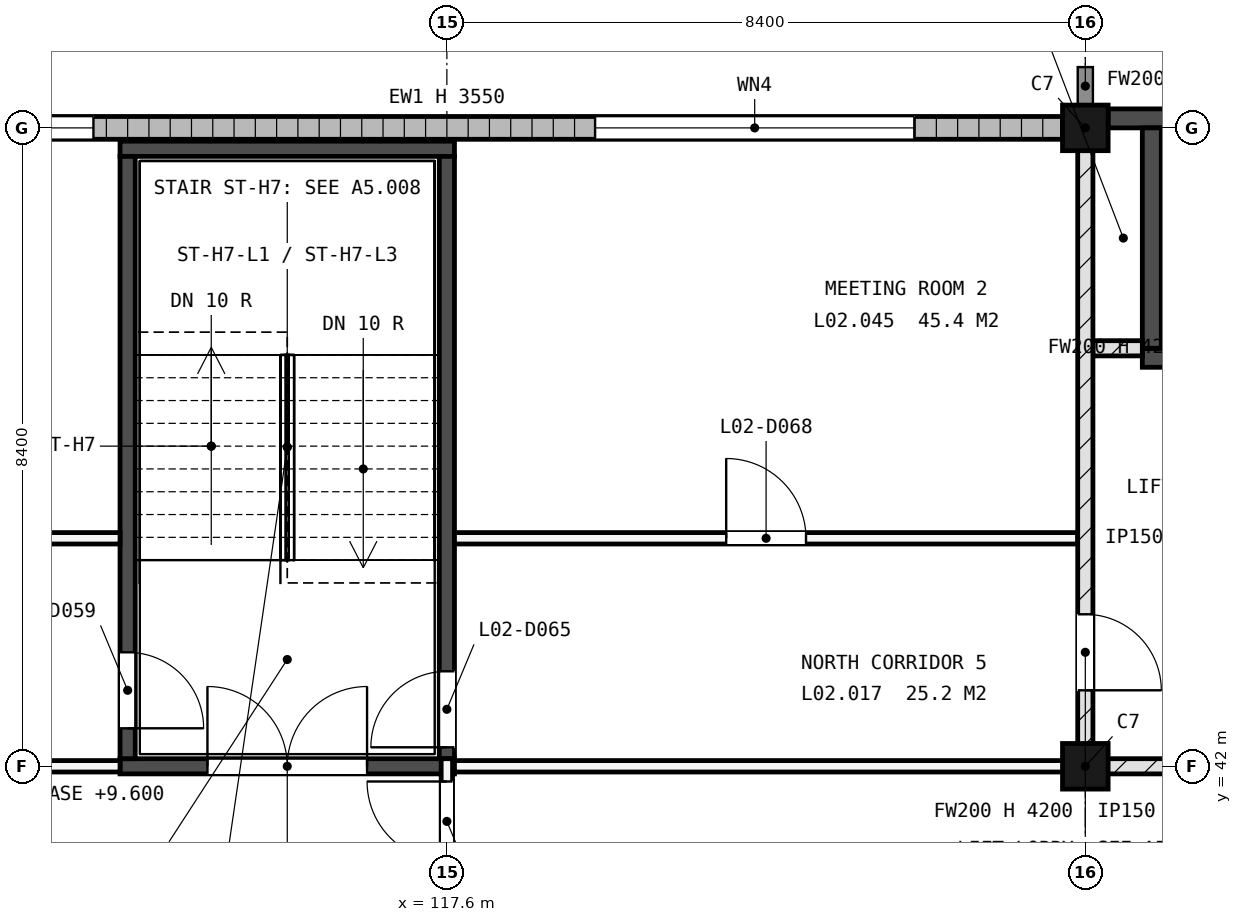
"""IFC4 building model, lengths in metres.
Left out: names, types, materials, properties, quantities, classifications, styles, units other than length and angle.
Written with IfcOpenShell. Run it as: python <this file> out.ifc"""

import sys

from ifc_helpers import new_model, si_unit, direction, frame, frame_2d, origin, origin_2d, place, context, subcontext, project, spatial, rectangle, extrude, element, fill, save


model = new_model("IFC4")
c1 = context("Model", 3, precision=1e-05, world=origin(), true_north=direction((0.0, 1.0)))
c2 = subcontext(c1, "Body", "Model", "MODEL_VIEW")
j1 = project(units=[si_unit("LENGTHUNIT", "METRE"), si_unit("PLANEANGLEUNIT", "RADIAN")], contexts=[c1])
p1 = place(None, origin())
s1 = spatial("IfcSite", under=j1, at=p1, CompositionType="ELEMENT")
p2 = place(p1, origin())
s2 = spatial("IfcBuilding", under=s1, at=p2, CompositionType="ELEMENT")
p3 = place(p2, frame((0.0, 0.0, 9.9)))
s3 = spatial("IfcBuildingStorey", under=s2, at=p3, CompositionType="ELEMENT", Elevation=9.9)
for number, where, z_axis, x_axis in (
    (1, (126.0, 42.0, -0.25), (0.0, 0.0, 1.0), (1.0, 0.0, 0.0)),
    (2, (126.0, 50.4, -0.25), (0.0, 0.0, 1.0), (1.0, 0.0, 0.0)),
):
    element("IfcColumn", number, at=place(p3, frame(where, z_axis=z_axis, x_axis=x_axis)), inside=s3, PredefinedType="COLUMN", context=c2, shape_type="SweptSolid", body=[
        extrude(rectangle(XDim=0.6, YDim=0.6, at=origin_2d()), origin(), (0.0, 0.0, 1.0), 4.45),
    ])
p4 = place(p3, frame((126.75, 47.375, -0.25), z_axis=(0.0, 0.0, 1.0), x_axis=(1.0, 0.0, 0.0)))
e3 = element("IfcWall", 3, at=p4, inside=s3, PredefinedType="SHEAR", context=c2, shape_type="SweptSolid", body=[
    extrude(rectangle(XDim=3.1, YDim=0.25, at=frame_2d((1.55, 0.0))), origin(), (0.0, 0.0, 1.0), 4.45),
])
p5 = place(p4, frame((1.0, 0.0, 0.25)))
e4 = element("IfcOpeningElement", 4, at=p5, cuts=e3, PredefinedType="OPENING", context=c2, shape_type="SweptSolid", body=[
    extrude(rectangle(XDim=1.1, YDim=2.1, at=frame_2d((0.55, 1.05))), frame((0.0, 0.135, 0.0), z_axis=(0.0, -1.0, 0.0), x_axis=(1.0, 0.0, 0.0)), (0.0, 0.0, 1.0), 0.27),
])
p6 = place(p3, frame((126.3, 50.525, -0.25), z_axis=(0.0, 0.0, 1.0), x_axis=(1.0, 0.0, 0.0)))
e5 = element("IfcWall", 5, at=p6, inside=s3, PredefinedType="SHEAR", context=c2, shape_type="SweptSolid", body=[
    extrude(rectangle(XDim=3.55, YDim=0.25, at=frame_2d((1.775, 0.0))), origin(), (0.0, 0.0, 1.0), 4.45),
])
p7 = place(p3, frame((126.875, 47.5, -0.25), z_axis=(0.0, 0.0, 1.0), x_axis=(0.0, 1.0, 0.0)))
e6 = element("IfcWall", 6, at=p7, inside=s3, PredefinedType="SHEAR", context=c2, shape_type="SweptSolid", body=[
    extrude(rectangle(XDim=2.9, YDim=0.25, at=frame_2d((1.45, 0.0))), origin(), (0.0, 0.0, 1.0), 4.45),
])
p8 = place(p3, frame((109.5, 50.4, 0.0), z_axis=(0.0, 0.0, 1.0), x_axis=(1.0, 0.0, 0.0)))
e7 = element("IfcWall", 7, at=p8, inside=s3, PredefinedType="STANDARD", context=c2, shape_type="SweptSolid", body=[
    extrude(rectangle(XDim=16.2, YDim=0.3, at=frame_2d((8.1, 0.0))), origin(), (0.0, 0.0, 1.0), 3.55),
])
p9 = place(p8, frame((0.45, 0.0, 0.9)))
e8 = element("IfcOpeningElement", 8, at=p9, cuts=e7, PredefinedType="OPENING", context=c2, shape_type="SweptSolid", body=[
    extrude(rectangle(XDim=3.0, YDim=1.5, at=frame_2d((1.5, 0.75))), frame((0.0, 0.16, 0.0), z_axis=(0.0, -1.0, 0.0), x_axis=(1.0, 0.0, 0.0)), (0.0, 0.0, 1.0), 0.32),
])
p10 = place(p8, frame((10.05, 0.0, 0.9)))
e9 = element("IfcOpeningElement", 9, at=p10, cuts=e7, PredefinedType="OPENING", context=c2, shape_type="SweptSolid", body=[
    extrude(rectangle(XDim=4.2, YDim=1.5, at=frame_2d((2.1, 0.75))), frame((0.0, 0.16, 0.0), z_axis=(0.0, -1.0, 0.0), x_axis=(1.0, 0.0, 0.0)), (0.0, 0.0, 1.0), 0.32),
])
p11 = place(p3, frame((113.3, 42.0, -0.3), z_axis=(0.0, 0.0, 1.0), x_axis=(1.0, 0.0, 0.0)))
e10 = element("IfcWall", 10, at=p11, inside=s3, PredefinedType="SHEAR", context=c2, shape_type="SweptSolid", body=[
    extrude(rectangle(XDim=4.4, YDim=0.2, at=frame_2d((2.2, 0.0))), origin(), (0.0, 0.0, 1.0), 4.5),
])
p12 = place(p11, frame((1.15, 0.0, 0.3)))
e11 = element("IfcOpeningElement", 11, at=p12, cuts=e10, PredefinedType="OPENING", context=c2, shape_type="SweptSolid", body=[
    extrude(rectangle(XDim=2.1, YDim=2.1, at=frame_2d((1.05, 1.05))), frame((0.0, 0.11, 0.0), z_axis=(0.0, -1.0, 0.0), x_axis=(1.0, 0.0, 0.0)), (0.0, 0.0, 1.0), 0.22),
])
p13 = place(p3, frame((113.3, 50.125, -0.3), z_axis=(0.0, 0.0, 1.0), x_axis=(1.0, 0.0, 0.0)))
e12 = element("IfcWall", 12, at=p13, inside=s3, PredefinedType="SHEAR", context=c2, shape_type="SweptSolid", body=[
    extrude(rectangle(XDim=4.4, YDim=0.2, at=frame_2d((2.2, 0.0))), origin(), (0.0, 0.0, 1.0), 4.5),
])
p14 = place(p3, frame((113.4, 42.1, -0.3), z_axis=(0.0, 0.0, 1.0), x_axis=(0.0, 1.0, 0.0)))
e13 = element("IfcWall", 13, at=p14, inside=s3, PredefinedType="SHEAR", context=c2, shape_type="SweptSolid", body=[
    extrude(rectangle(XDim=7.925, YDim=0.2, at=frame_2d((3.962, 0.0))), origin(), (0.0, 0.0, 1.0), 4.5),
])
p15 = place(p14, frame((0.4, 0.0, 0.3)))
e14 = element("IfcOpeningElement", 14, at=p15, cuts=e13, PredefinedType="OPENING", context=c2, shape_type="SweptSolid", body=[
    extrude(rectangle(XDim=1.0, YDim=2.1, at=frame_2d((0.5, 1.05))), frame((0.0, 0.11, 0.0), z_axis=(0.0, -1.0, 0.0), x_axis=(1.0, 0.0, 0.0)), (0.0, 0.0, 1.0), 0.22),
])
p16 = place(p3, frame((117.6, 42.1, -0.3), z_axis=(0.0, 0.0, 1.0), x_axis=(0.0, 1.0, 0.0)))
e15 = element("IfcWall", 15, at=p16, inside=s3, PredefinedType="SHEAR", context=c2, shape_type="SweptSolid", body=[
    extrude(rectangle(XDim=7.925, YDim=0.2, at=frame_2d((3.962, 0.0))), origin(), (0.0, 0.0, 1.0), 4.5),
])
p17 = place(p16, frame((0.15, 0.0, 0.3)))
e16 = element("IfcOpeningElement", 16, at=p17, cuts=e15, PredefinedType="OPENING", context=c2, shape_type="SweptSolid", body=[
    extrude(rectangle(XDim=1.0, YDim=2.1, at=frame_2d((0.5, 1.05))), frame((0.0, 0.11, 0.0), z_axis=(0.0, -1.0, 0.0), x_axis=(1.0, 0.0, 0.0)), (0.0, 0.0, 1.0), 0.22),
])
p18 = place(p3, frame((109.4, 42.0, 0.0), z_axis=(0.0, 0.0, 1.0), x_axis=(1.0, 0.0, 0.0)))
e17 = element("IfcWall", 17, at=p18, inside=s3, PredefinedType="PARTITIONING", context=c2, shape_type="SweptSolid", body=[
    extrude(rectangle(XDim=3.9, YDim=0.15, at=frame_2d((1.95, 0.0))), origin(), (0.0, 0.0, 1.0), 3.55),
])
p19 = place(p3, frame((117.7, 42.0, 0.0), z_axis=(0.0, 0.0, 1.0), x_axis=(1.0, 0.0, 0.0)))
e18 = element("IfcWall", 18, at=p19, inside=s3, PredefinedType="PARTITIONING", context=c2, shape_type="SweptSolid", body=[
    extrude(rectangle(XDim=8.3, YDim=0.15, at=frame_2d((4.15, 0.0))), origin(), (0.0, 0.0, 1.0), 4.2),
])
p20 = place(p3, frame((126.0, 42.0, 0.0), z_axis=(0.0, 0.0, 1.0), x_axis=(1.0, 0.0, 0.0)))
e19 = element("IfcWall", 19, at=p20, inside=s3, PredefinedType="SOLIDWALL", context=c2, shape_type="SweptSolid", body=[
    extrude(rectangle(XDim=4.1, YDim=0.2, at=frame_2d((2.05, 0.0))), origin(), (0.0, 0.0, 1.0), 4.2),
])
p21 = place(p3, frame((92.5, 45.0, 0.0), z_axis=(0.0, 0.0, 1.0), x_axis=(1.0, 0.0, 0.0)))
e20 = element("IfcWall", 20, at=p21, inside=s3, PredefinedType="PARTITIONING", context=c2, shape_type="SweptSolid", body=[
    extrude(rectangle(XDim=20.8, YDim=0.15, at=frame_2d((10.4, 0.0))), origin(), (0.0, 0.0, 1.0), 4.2),
])
p22 = place(p21, frame((9.9, 0.0, 0.0)))
e21 = element("IfcOpeningElement", 21, at=p22, cuts=e20, PredefinedType="OPENING", context=c2, shape_type="SweptSolid", body=[
    extrude(rectangle(XDim=1.0, YDim=2.1, at=frame_2d((0.5, 1.05))), frame((0.0, 0.085, 0.0), z_axis=(0.0, -1.0, 0.0), x_axis=(1.0, 0.0, 0.0)), (0.0, 0.0, 1.0), 0.17),
])
p23 = place(p3, frame((117.7, 45.0, 0.0), z_axis=(0.0, 0.0, 1.0), x_axis=(1.0, 0.0, 0.0)))
e22 = element("IfcWall", 22, at=p23, inside=s3, PredefinedType="PARTITIONING", context=c2, shape_type="SweptSolid", body=[
    extrude(rectangle(XDim=8.2, YDim=0.15, at=frame_2d((4.1, 0.0))), origin(), (0.0, 0.0, 1.0), 4.2),
])
p24 = place(p23, frame((3.575, 0.0, 0.0)))
e23 = element("IfcOpeningElement", 23, at=p24, cuts=e22, PredefinedType="OPENING", context=c2, shape_type="SweptSolid", body=[
    extrude(rectangle(XDim=1.05, YDim=2.1, at=frame_2d((0.525, 1.05))), frame((0.0, 0.085, 0.0), z_axis=(0.0, -1.0, 0.0), x_axis=(1.0, 0.0, 0.0)), (0.0, 0.0, 1.0), 0.17),
])
p25 = place(p3, frame((126.1, 47.5, 0.0), z_axis=(0.0, 0.0, 1.0), x_axis=(1.0, 0.0, 0.0)))
e24 = element("IfcWall", 24, at=p25, inside=s3, PredefinedType="SOLIDWALL", context=c2, shape_type="SweptSolid", body=[
    extrude(rectangle(XDim=0.65, YDim=0.2, at=frame_2d((0.325, 0.0))), origin(), (0.0, 0.0, 1.0), 4.2),
])
p26 = place(p3, frame((117.6, 33.32, 0.0), z_axis=(0.0, 0.0, 1.0), x_axis=(0.0, 1.0, 0.0)))
e25 = element("IfcWall", 25, at=p26, inside=s3, PredefinedType="PARTITIONING", context=c2, shape_type="SweptSolid", body=[
    extrude(rectangle(XDim=8.78, YDim=0.15, at=frame_2d((4.39, 0.0))), origin(), (0.0, 0.0, 1.0), 4.2),
])
p27 = place(p26, frame((7.43, 0.0, 0.0)))
e26 = element("IfcOpeningElement", 26, at=p27, cuts=e25, PredefinedType="OPENING", context=c2, shape_type="SweptSolid", body=[
    extrude(rectangle(XDim=1.05, YDim=2.1, at=frame_2d((0.525, 1.05))), frame((0.0, 0.085, 0.0), z_axis=(0.0, -1.0, 0.0), x_axis=(1.0, 0.0, 0.0)), (0.0, 0.0, 1.0), 0.17),
])
p28 = place(p3, frame((126.0, 42.1, 0.0), z_axis=(0.0, 0.0, 1.0), x_axis=(0.0, 1.0, 0.0)))
e27 = element("IfcWall", 27, at=p28, inside=s3, PredefinedType="SOLIDWALL", context=c2, shape_type="SweptSolid", body=[
    extrude(rectangle(XDim=8.3, YDim=0.2, at=frame_2d((4.15, 0.0))), origin(), (0.0, 0.0, 1.0), 3.4),
])
p29 = place(p28, frame((0.9, 0.0, 0.0)))
e28 = element("IfcOpeningElement", 28, at=p29, cuts=e27, PredefinedType="OPENING", context=c2, shape_type="SweptSolid", body=[
    extrude(rectangle(XDim=1.0, YDim=2.1, at=frame_2d((0.5, 1.05))), frame((0.0, 0.11, 0.0), z_axis=(0.0, -1.0, 0.0), x_axis=(1.0, 0.0, 0.0)), (0.0, 0.0, 1.0), 0.22),
])
p30 = place(p9, origin())
e29 = element("IfcWindow", 29, at=p30, inside=s3, PartitioningType="SINGLE_PANEL", PredefinedType="WINDOW", context=c2, shape_type="SweptSolid", body=[
    extrude(rectangle(XDim=3.0, YDim=1.5, at=frame_2d((1.5, 0.75))), frame((0.0, 0.03, 0.0), z_axis=(0.0, -1.0, 0.0), x_axis=(1.0, 0.0, 0.0)), (0.0, 0.0, 1.0), 0.06),
])
fill(e8, e29)
p31 = place(p10, origin())
e30 = element("IfcWindow", 30, at=p31, inside=s3, PartitioningType="SINGLE_PANEL", PredefinedType="WINDOW", context=c2, shape_type="SweptSolid", body=[
    extrude(rectangle(XDim=4.2, YDim=1.5, at=frame_2d((2.1, 0.75))), frame((0.0, 0.03, 0.0), z_axis=(0.0, -1.0, 0.0), x_axis=(1.0, 0.0, 0.0)), (0.0, 0.0, 1.0), 0.06),
])
fill(e9, e30)
p32 = place(p12, origin())
e31 = element("IfcDoor", 31, at=p32, inside=s3, OperationType="DOUBLE_DOOR_SINGLE_SWING", PredefinedType="DOOR", context=c2, shape_type="SweptSolid", body=[
    extrude(rectangle(XDim=2.1, YDim=2.1, at=frame_2d((1.05, 1.05))), frame((0.0, 0.025, 0.0), z_axis=(0.0, -1.0, 0.0), x_axis=(1.0, 0.0, 0.0)), (0.0, 0.0, 1.0), 0.05),
])
fill(e11, e31)
p33 = place(p17, origin())
e32 = element("IfcDoor", 32, at=p33, inside=s3, OperationType="SINGLE_SWING_RIGHT", PredefinedType="DOOR", context=c2, shape_type="SweptSolid", body=[
    extrude(rectangle(XDim=1.0, YDim=2.1, at=frame_2d((0.5, 1.05))), frame((0.0, 0.025, 0.0), z_axis=(0.0, -1.0, 0.0), x_axis=(1.0, 0.0, 0.0)), (0.0, 0.0, 1.0), 0.05),
])
fill(e16, e32)
p34 = place(p27, origin())
e33 = element("IfcDoor", 33, at=p34, inside=s3, OperationType="SINGLE_SWING_LEFT", PredefinedType="DOOR", context=c2, shape_type="SweptSolid", body=[
    extrude(rectangle(XDim=1.05, YDim=2.1, at=frame_2d((0.525, 1.05))), frame((0.0, 0.025, 0.0), z_axis=(0.0, -1.0, 0.0), x_axis=(1.0, 0.0, 0.0)), (0.0, 0.0, 1.0), 0.05),
])
fill(e26, e33)
p35 = place(p24, origin())
e34 = element("IfcDoor", 34, at=p35, inside=s3, OperationType="SINGLE_SWING_RIGHT", PredefinedType="DOOR", context=c2, shape_type="SweptSolid", body=[
    extrude(rectangle(XDim=1.05, YDim=2.1, at=frame_2d((0.525, 1.05))), frame((0.0, 0.025, 0.0), z_axis=(0.0, -1.0, 0.0), x_axis=(1.0, 0.0, 0.0)), (0.0, 0.0, 1.0), 0.05),
])
fill(e23, e34)
p36 = place(p15, origin())
e35 = element("IfcDoor", 35, at=p36, inside=s3, OperationType="SINGLE_SWING_LEFT", PredefinedType="DOOR", context=c2, shape_type="SweptSolid", body=[
    extrude(rectangle(XDim=1.0, YDim=2.1, at=frame_2d((0.5, 1.05))), frame((0.0, 0.025, 0.0), z_axis=(0.0, -1.0, 0.0), x_axis=(1.0, 0.0, 0.0)), (0.0, 0.0, 1.0), 0.05),
])
fill(e14, e35)
p37 = place(p29, origin())
e36 = element("IfcDoor", 36, at=p37, inside=s3, OperationType="SINGLE_SWING_LEFT", PredefinedType="DOOR", context=c2, shape_type="SweptSolid", body=[
    extrude(rectangle(XDim=1.0, YDim=2.1, at=frame_2d((0.5, 1.05))), frame((0.0, 0.025, 0.0), z_axis=(0.0, -1.0, 0.0), x_axis=(1.0, 0.0, 0.0)), (0.0, 0.0, 1.0), 0.05),
])
fill(e28, e36)
save(model, sys.argv[1])
